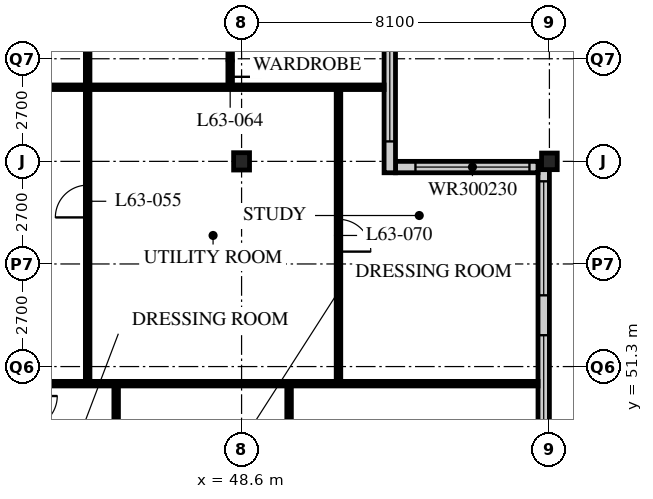
"""IFC4 building model, lengths in metres.
Left out: names, types, materials, properties, quantities, classifications, styles, units other than length and angle.
Written with IfcOpenShell. Run it as: python <this file> out.ifc"""

import sys

from ifc_helpers import new_model, si_unit, direction, frame, frame_2d, origin, origin_2d, place, context, subcontext, project, spatial, rectangle, i_section, extrude, element, fill, save


model = new_model("IFC4")
c1 = context("Model", 3, precision=1e-05, world=origin(), true_north=direction((0.0, 1.0)))
c2 = subcontext(c1, "Body", "Model", "MODEL_VIEW")
j1 = project(units=[si_unit("LENGTHUNIT", "METRE"), si_unit("PLANEANGLEUNIT", "RADIAN")], contexts=[c1])
p1 = place(None, origin())
s1 = spatial("IfcSite", under=j1, at=p1, CompositionType="ELEMENT")
p2 = place(p1, origin())
s2 = spatial("IfcBuilding", under=s1, at=p2, CompositionType="ELEMENT")
p3 = place(p2, frame((0.0, 0.0, 246.3)))
s3 = spatial("IfcBuildingStorey", under=s2, at=p3, CompositionType="ELEMENT", Elevation=246.3)
p4 = place(p3, frame((48.6, 56.7, 0.0), z_axis=(0.0, 0.0, 1.0), x_axis=(1.0, 0.0, 0.0)))
e1 = element("IfcColumn", 1, at=p4, inside=s3, PredefinedType="COLUMN", context=c2, shape_type="SweptSolid", body=[
    extrude(i_section(OverallWidth=0.418, OverallDepth=0.456, WebThickness=0.042, FlangeThickness=0.067, FilletRadius=0.015, at=origin_2d()), origin(), (0.0, 0.0, 1.0), 3.9),
])
p5 = place(p3, frame((56.7, 56.7, 0.0), z_axis=(0.0, 0.0, 1.0), x_axis=(1.0, 0.0, 0.0)))
e2 = element("IfcColumn", 2, at=p5, inside=s3, PredefinedType="COLUMN", context=c2, shape_type="SweptSolid", body=[
    extrude(i_section(OverallWidth=0.412, OverallDepth=0.437, WebThickness=0.036, FlangeThickness=0.058, FilletRadius=0.015, at=origin_2d()), origin(), (0.0, 0.0, 1.0), 3.9),
])
p6 = place(p3, frame((56.55, 24.6, 0.0), z_axis=(0.0, 0.0, 1.0), x_axis=(0.0, 1.0, 0.0)))
e3 = element("IfcWall", 3, at=p6, inside=s3, PredefinedType="SOLIDWALL", context=c2, shape_type="SweptSolid", body=[
    extrude(rectangle(XDim=32.1, YDim=0.3, at=frame_2d((16.05, 0.0))), origin(), (0.0, 0.0, 1.0), 3.69),
])
p7 = place(p6, frame((0.225, 0.0, 0.6)))
e4 = element("IfcOpeningElement", 4, at=p7, cuts=e3, PredefinedType="OPENING", context=c2, shape_type="SweptSolid", body=[
    extrude(rectangle(XDim=3.0, YDim=2.4, at=frame_2d((1.5, 1.2))), frame((0.0, 0.16, 0.0), z_axis=(0.0, -1.0, 0.0), x_axis=(1.0, 0.0, 0.0)), (0.0, 0.0, 1.0), 0.32),
])
p8 = place(p6, frame((4.275, 0.0, 0.6)))
e5 = element("IfcOpeningElement", 5, at=p8, cuts=e3, PredefinedType="OPENING", context=c2, shape_type="SweptSolid", body=[
    extrude(rectangle(XDim=3.0, YDim=2.4, at=frame_2d((1.5, 1.2))), frame((0.0, 0.16, 0.0), z_axis=(0.0, -1.0, 0.0), x_axis=(1.0, 0.0, 0.0)), (0.0, 0.0, 1.0), 0.32),
])
p9 = place(p6, frame((8.325, 0.0, 0.6)))
e6 = element("IfcOpeningElement", 6, at=p9, cuts=e3, PredefinedType="OPENING", context=c2, shape_type="SweptSolid", body=[
    extrude(rectangle(XDim=3.0, YDim=2.4, at=frame_2d((1.5, 1.2))), frame((0.0, 0.16, 0.0), z_axis=(0.0, -1.0, 0.0), x_axis=(1.0, 0.0, 0.0)), (0.0, 0.0, 1.0), 0.32),
])
p10 = place(p6, frame((12.375, 0.0, 0.6)))
e7 = element("IfcOpeningElement", 7, at=p10, cuts=e3, PredefinedType="OPENING", context=c2, shape_type="SweptSolid", body=[
    extrude(rectangle(XDim=3.0, YDim=2.4, at=frame_2d((1.5, 1.2))), frame((0.0, 0.16, 0.0), z_axis=(0.0, -1.0, 0.0), x_axis=(1.0, 0.0, 0.0)), (0.0, 0.0, 1.0), 0.32),
])
p11 = place(p6, frame((16.425, 0.0, 0.6)))
e8 = element("IfcOpeningElement", 8, at=p11, cuts=e3, PredefinedType="OPENING", context=c2, shape_type="SweptSolid", body=[
    extrude(rectangle(XDim=3.0, YDim=2.4, at=frame_2d((1.5, 1.2))), frame((0.0, 0.16, 0.0), z_axis=(0.0, -1.0, 0.0), x_axis=(1.0, 0.0, 0.0)), (0.0, 0.0, 1.0), 0.32),
])
p12 = place(p6, frame((20.475, 0.0, 0.6)))
e9 = element("IfcOpeningElement", 9, at=p12, cuts=e3, PredefinedType="OPENING", context=c2, shape_type="SweptSolid", body=[
    extrude(rectangle(XDim=3.0, YDim=2.4, at=frame_2d((1.5, 1.2))), frame((0.0, 0.16, 0.0), z_axis=(0.0, -1.0, 0.0), x_axis=(1.0, 0.0, 0.0)), (0.0, 0.0, 1.0), 0.32),
])
p13 = place(p6, frame((24.525, 0.0, 0.6)))
e10 = element("IfcOpeningElement", 10, at=p13, cuts=e3, PredefinedType="OPENING", context=c2, shape_type="SweptSolid", body=[
    extrude(rectangle(XDim=3.0, YDim=2.4, at=frame_2d((1.5, 1.2))), frame((0.0, 0.16, 0.0), z_axis=(0.0, -1.0, 0.0), x_axis=(1.0, 0.0, 0.0)), (0.0, 0.0, 1.0), 0.32),
])
p14 = place(p6, frame((28.575, 0.0, 0.6)))
e11 = element("IfcOpeningElement", 11, at=p14, cuts=e3, PredefinedType="OPENING", context=c2, shape_type="SweptSolid", body=[
    extrude(rectangle(XDim=3.0, YDim=2.4, at=frame_2d((1.5, 1.2))), frame((0.0, 0.16, 0.0), z_axis=(0.0, -1.0, 0.0), x_axis=(1.0, 0.0, 0.0)), (0.0, 0.0, 1.0), 0.32),
])
p15 = place(p3, frame((56.4, 56.55, 0.0), z_axis=(0.0, 0.0, 1.0), x_axis=(-1.0, 0.0, 0.0)))
e12 = element("IfcWall", 12, at=p15, inside=s3, PredefinedType="SOLIDWALL", context=c2, shape_type="SweptSolid", body=[
    extrude(rectangle(XDim=3.75, YDim=0.3, at=frame_2d((1.875, 0.0))), origin(), (0.0, 0.0, 1.0), 3.69),
])
p16 = place(p15, frame((0.225, 0.0, 0.6)))
e13 = element("IfcOpeningElement", 13, at=p16, cuts=e12, PredefinedType="OPENING", context=c2, shape_type="SweptSolid", body=[
    extrude(rectangle(XDim=3.0, YDim=2.3, at=frame_2d((1.5, 1.15))), frame((0.0, 0.16, 0.0), z_axis=(0.0, -1.0, 0.0), x_axis=(1.0, 0.0, 0.0)), (0.0, 0.0, 1.0), 0.32),
])
p17 = place(p3, frame((52.5, 56.4, 0.0), z_axis=(0.0, 0.0, 1.0), x_axis=(0.0, 1.0, 0.0)))
e14 = element("IfcWall", 14, at=p17, inside=s3, PredefinedType="SOLIDWALL", context=c2, shape_type="SweptSolid", body=[
    extrude(rectangle(XDim=4.35, YDim=0.3, at=frame_2d((2.175, 0.0))), origin(), (0.0, 0.0, 1.0), 3.69),
])
p18 = place(p17, frame((0.825, 0.0, 0.6)))
e15 = element("IfcOpeningElement", 15, at=p18, cuts=e14, PredefinedType="OPENING", context=c2, shape_type="SweptSolid", body=[
    extrude(rectangle(XDim=3.0, YDim=2.3, at=frame_2d((1.5, 1.15))), frame((0.0, 0.16, 0.0), z_axis=(0.0, -1.0, 0.0), x_axis=(1.0, 0.0, 0.0)), (0.0, 0.0, 1.0), 0.32),
])
p19 = place(p3, frame((42.9, 50.85, 0.0), z_axis=(0.0, 0.0, 1.0), x_axis=(1.0, 0.0, 0.0)))
e16 = element("IfcWall", 16, at=p19, inside=s3, PredefinedType="PARTITIONING", context=c2, shape_type="SweptSolid", body=[
    extrude(rectangle(XDim=13.5, YDim=0.12, at=frame_2d((6.75, 0.0))), origin(), (0.0, 0.0, 1.0), 3.69),
])
p20 = place(p3, frame((36.45, 58.65, 0.0), z_axis=(0.0, 0.0, 1.0), x_axis=(1.0, 0.0, 0.0)))
e17 = element("IfcWall", 17, at=p20, inside=s3, PredefinedType="PARTITIONING", context=c2, shape_type="SweptSolid", body=[
    extrude(rectangle(XDim=15.9, YDim=0.12, at=frame_2d((7.95, 0.0))), origin(), (0.0, 0.0, 1.0), 3.69),
])
p21 = place(p20, frame((1.675, 0.0, 0.0)))
e18 = element("IfcOpeningElement", 18, at=p21, cuts=e17, PredefinedType="OPENING", context=c2, shape_type="SweptSolid", body=[
    extrude(rectangle(XDim=0.85, YDim=2.1, at=frame_2d((0.425, 1.05))), frame((0.0, 0.07, 0.0), z_axis=(0.0, -1.0, 0.0), x_axis=(1.0, 0.0, 0.0)), (0.0, 0.0, 1.0), 0.14),
])
p22 = place(p3, frame((44.55, 64.5, 0.0), z_axis=(0.0, 0.0, 1.0), x_axis=(0.0, -1.0, 0.0)))
e19 = element("IfcWall", 19, at=p22, inside=s3, PredefinedType="PARTITIONING", context=c2, shape_type="SweptSolid", body=[
    extrude(rectangle(XDim=13.65, YDim=0.12, at=frame_2d((6.825, 0.0))), origin(), (0.0, 0.0, 1.0), 3.69),
])
p23 = place(p22, frame((8.425, 0.0, 0.0)))
e20 = element("IfcOpeningElement", 20, at=p23, cuts=e19, PredefinedType="OPENING", context=c2, shape_type="SweptSolid", body=[
    extrude(rectangle(XDim=0.85, YDim=2.1, at=frame_2d((0.425, 1.05))), frame((0.0, 0.07, 0.0), z_axis=(0.0, -1.0, 0.0), x_axis=(1.0, 0.0, 0.0)), (0.0, 0.0, 1.0), 0.14),
])
p24 = place(p22, frame((2.5, 0.0, 0.0)))
e21 = element("IfcOpeningElement", 21, at=p24, cuts=e19, PredefinedType="OPENING", context=c2, shape_type="SweptSolid", body=[
    extrude(rectangle(XDim=0.85, YDim=2.1, at=frame_2d((0.425, 1.05))), frame((0.0, 0.07, 0.0), z_axis=(0.0, -1.0, 0.0), x_axis=(1.0, 0.0, 0.0)), (0.0, 0.0, 1.0), 0.14),
])
p25 = place(p3, frame((48.3, 58.65, 0.0), z_axis=(0.0, 0.0, 1.0), x_axis=(0.0, 1.0, 0.0)))
e22 = element("IfcWall", 22, at=p25, inside=s3, PredefinedType="PARTITIONING", context=c2, shape_type="SweptSolid", body=[
    extrude(rectangle(XDim=1.8, YDim=0.12, at=frame_2d((0.9, 0.0))), origin(), (0.0, 0.0, 1.0), 3.69),
])
p26 = place(p25, frame((0.275, 0.0, 0.0)))
e23 = element("IfcOpeningElement", 23, at=p26, cuts=e22, PredefinedType="OPENING", context=c2, shape_type="SweptSolid", body=[
    extrude(rectangle(XDim=0.85, YDim=2.1, at=frame_2d((0.425, 1.05))), frame((0.0, 0.07, 0.0), z_axis=(0.0, -1.0, 0.0), x_axis=(1.0, 0.0, 0.0)), (0.0, 0.0, 1.0), 0.14),
])
p27 = place(p3, frame((45.3, 50.85, 0.0), z_axis=(0.0, 0.0, 1.0), x_axis=(0.0, -1.0, 0.0)))
e24 = element("IfcWall", 24, at=p27, inside=s3, PredefinedType="PARTITIONING", context=c2, shape_type="SweptSolid", body=[
    extrude(rectangle(XDim=4.01, YDim=0.12, at=frame_2d((2.005, 0.0))), origin(), (0.0, 0.0, 1.0), 3.69),
])
p28 = place(p27, frame((2.885, 0.0, 0.0)))
e25 = element("IfcOpeningElement", 25, at=p28, cuts=e24, PredefinedType="OPENING", context=c2, shape_type="SweptSolid", body=[
    extrude(rectangle(XDim=0.85, YDim=2.1, at=frame_2d((0.425, 1.05))), frame((0.0, 0.07, 0.0), z_axis=(0.0, -1.0, 0.0), x_axis=(1.0, 0.0, 0.0)), (0.0, 0.0, 1.0), 0.14),
])
p29 = place(p3, frame((51.15, 50.85, 0.0), z_axis=(0.0, 0.0, 1.0), x_axis=(0.0, 1.0, 0.0)))
e26 = element("IfcWall", 26, at=p29, inside=s3, PredefinedType="PARTITIONING", context=c2, shape_type="SweptSolid", body=[
    extrude(rectangle(XDim=7.8, YDim=0.12, at=frame_2d((3.9, 0.0))), origin(), (0.0, 0.0, 1.0), 3.69),
])
p30 = place(p29, frame((3.475, 0.0, 0.0)))
e27 = element("IfcOpeningElement", 27, at=p30, cuts=e26, PredefinedType="OPENING", context=c2, shape_type="SweptSolid", body=[
    extrude(rectangle(XDim=0.85, YDim=2.1, at=frame_2d((0.425, 1.05))), frame((0.0, 0.07, 0.0), z_axis=(0.0, -1.0, 0.0), x_axis=(1.0, 0.0, 0.0)), (0.0, 0.0, 1.0), 0.14),
])
p31 = place(p3, frame((49.85, 44.55, 0.0), z_axis=(0.0, 0.0, 1.0), x_axis=(0.0, 1.0, 0.0)))
e28 = element("IfcWall", 28, at=p31, inside=s3, PredefinedType="PARTITIONING", context=c2, shape_type="SweptSolid", body=[
    extrude(rectangle(XDim=6.3, YDim=0.12, at=frame_2d((3.15, 0.0))), origin(), (0.0, 0.0, 1.0), 3.69),
])
p32 = place(p31, frame((2.725, 0.0, 0.0)))
e29 = element("IfcOpeningElement", 29, at=p32, cuts=e28, PredefinedType="OPENING", context=c2, shape_type="SweptSolid", body=[
    extrude(rectangle(XDim=0.85, YDim=2.1, at=frame_2d((0.425, 1.05))), frame((0.0, 0.07, 0.0), z_axis=(0.0, -1.0, 0.0), x_axis=(1.0, 0.0, 0.0)), (0.0, 0.0, 1.0), 0.14),
])
p33 = place(p13, origin())
e30 = element("IfcWindow", 30, at=p33, inside=s3, PartitioningType="SINGLE_PANEL", PredefinedType="WINDOW", context=c2, shape_type="SweptSolid", body=[
    extrude(rectangle(XDim=3.0, YDim=2.4, at=frame_2d((1.5, 1.2))), frame((0.0, 0.03, 0.0), z_axis=(0.0, -1.0, 0.0), x_axis=(1.0, 0.0, 0.0)), (0.0, 0.0, 1.0), 0.06),
])
fill(e10, e30)
p34 = place(p14, origin())
e31 = element("IfcWindow", 31, at=p34, inside=s3, PartitioningType="SINGLE_PANEL", PredefinedType="WINDOW", context=c2, shape_type="SweptSolid", body=[
    extrude(rectangle(XDim=3.0, YDim=2.4, at=frame_2d((1.5, 1.2))), frame((0.0, 0.03, 0.0), z_axis=(0.0, -1.0, 0.0), x_axis=(1.0, 0.0, 0.0)), (0.0, 0.0, 1.0), 0.06),
])
fill(e11, e31)
p35 = place(p16, origin())
e32 = element("IfcWindow", 32, at=p35, inside=s3, PartitioningType="SINGLE_PANEL", PredefinedType="WINDOW", context=c2, shape_type="SweptSolid", body=[
    extrude(rectangle(XDim=3.0, YDim=2.3, at=frame_2d((1.5, 1.15))), frame((0.0, 0.03, 0.0), z_axis=(0.0, -1.0, 0.0), x_axis=(1.0, 0.0, 0.0)), (0.0, 0.0, 1.0), 0.06),
])
fill(e13, e32)
p36 = place(p18, origin())
e33 = element("IfcWindow", 33, at=p36, inside=s3, PartitioningType="SINGLE_PANEL", PredefinedType="WINDOW", context=c2, shape_type="SweptSolid", body=[
    extrude(rectangle(XDim=3.0, YDim=2.3, at=frame_2d((1.5, 1.15))), frame((0.0, 0.03, 0.0), z_axis=(0.0, -1.0, 0.0), x_axis=(1.0, 0.0, 0.0)), (0.0, 0.0, 1.0), 0.06),
])
fill(e15, e33)
p37 = place(p23, origin())
e34 = element("IfcDoor", 34, at=p37, inside=s3, OperationType="SINGLE_SWING_LEFT", PredefinedType="DOOR", context=c2, shape_type="SweptSolid", body=[
    extrude(rectangle(XDim=0.85, YDim=2.1, at=frame_2d((0.425, 1.05))), frame((0.0, 0.025, 0.0), z_axis=(0.0, -1.0, 0.0), x_axis=(1.0, 0.0, 0.0)), (0.0, 0.0, 1.0), 0.05),
])
fill(e20, e34)
p38 = place(p26, origin())
e35 = element("IfcDoor", 35, at=p38, inside=s3, OperationType="SINGLE_SWING_RIGHT", PredefinedType="DOOR", context=c2, shape_type="SweptSolid", body=[
    extrude(rectangle(XDim=0.85, YDim=2.1, at=frame_2d((0.425, 1.05))), frame((0.0, 0.025, 0.0), z_axis=(0.0, -1.0, 0.0), x_axis=(1.0, 0.0, 0.0)), (0.0, 0.0, 1.0), 0.05),
])
fill(e23, e35)
p39 = place(p30, origin())
e36 = element("IfcDoor", 36, at=p39, inside=s3, OperationType="SINGLE_SWING_RIGHT", PredefinedType="DOOR", context=c2, shape_type="SweptSolid", body=[
    extrude(rectangle(XDim=0.85, YDim=2.1, at=frame_2d((0.425, 1.05))), frame((0.0, 0.025, 0.0), z_axis=(0.0, -1.0, 0.0), x_axis=(1.0, 0.0, 0.0)), (0.0, 0.0, 1.0), 0.05),
])
fill(e27, e36)
save(model, sys.argv[1])
